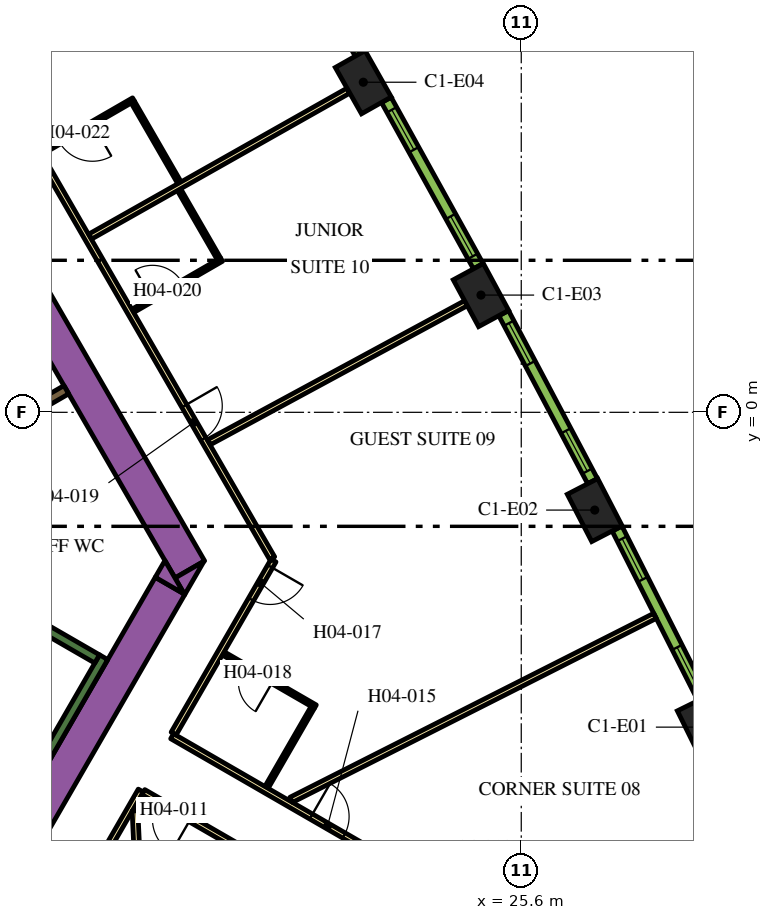
"""IFC4 building model, lengths in metres.
Left out: names, types, materials, properties, quantities, classifications, styles, units other than length and angle.
Written with IfcOpenShell. Run it as: python <this file> out.ifc"""

import sys

from ifc_helpers import new_model, si_unit, direction, frame, frame_2d, origin, origin_2d, place, context, subcontext, project, spatial, polyline, rectangle, outline, extrude, element, fill, save


model = new_model("IFC4")
c1 = context("Model", 3, precision=1e-05, world=origin(), true_north=direction((0.0, 1.0)))
c2 = subcontext(c1, "Body", "Model", "MODEL_VIEW")
j1 = project(units=[si_unit("LENGTHUNIT", "METRE"), si_unit("PLANEANGLEUNIT", "RADIAN")], contexts=[c1])
p1 = place(None, origin())
s1 = spatial("IfcSite", under=j1, at=p1, CompositionType="ELEMENT")
p2 = place(p1, origin())
s2 = spatial("IfcBuilding", under=s1, at=p2, CompositionType="ELEMENT")
p3 = place(p2, frame((0.0, 0.0, 70.5)))
s3 = spatial("IfcBuildingStorey", under=s2, at=p3, CompositionType="ELEMENT", Elevation=70.5)
for number, where, z_axis, x_axis in (
    (1, (30.421, -8.284, 0.0), (0.0, 0.0, 1.0), (-0.443, 0.897, 0.0)),
    (2, (27.533, -2.572, 0.0), (0.0, 0.0, 1.0), (-0.459, 0.888, 0.0)),
    (3, (24.54, 3.085, 0.0), (0.0, 0.0, 1.0), (-0.476, 0.88, 0.0)),
    (4, (21.443, 8.685, 0.0), (0.0, 0.0, 1.0), (-0.492, 0.871, 0.0)),
):
    element("IfcColumn", number, at=place(p3, frame(where, z_axis=z_axis, x_axis=x_axis)), inside=s3, PredefinedType="COLUMN", context=c2, shape_type="SweptSolid", body=[
        extrude(rectangle(XDim=1.4, YDim=0.9, at=origin_2d()), origin(), (0.0, 0.0, 1.0), 3.9),
    ])
p4 = place(p3, frame((6.461, 13.909, 0.0), z_axis=(0.0, 0.0, 1.0), x_axis=(0.500005804227, -0.866022052686, 0.0)))
e5 = element("IfcWall", 5, at=p4, inside=s3, PredefinedType="SOLIDWALL", context=c2, shape_type="SweptSolid", body=[
    extrude(rectangle(XDim=20.834, YDim=0.9, at=frame_2d((10.417, 0.0))), origin(), (0.0, 0.0, 1.0), 3.9),
])
p5 = place(p3, origin())
e6 = element("IfcWall", 6, at=p5, inside=s3, PredefinedType="SOLIDWALL", context=c2, shape_type="SweptSolid", body=[
    extrude(outline(polyline([(16.743, -4.8), (16.489, -4.36), (17.251, -3.92), (16.743, -4.8)])), origin(), (0.0, 0.0, 1.0), 3.9),
])
p6 = place(p3, frame((11.695, -12.644, 0.0), z_axis=(0.0, 0.0, 1.0), x_axis=(0.500010229568, 0.86601949766, 0.0)))
e7 = element("IfcWall", 7, at=p6, inside=s3, PredefinedType="SOLIDWALL", context=c2, shape_type="SweptSolid", body=[
    extrude(rectangle(XDim=9.326, YDim=0.9, at=frame_2d((4.663, 0.0))), origin(), (0.0, 0.0, 1.0), 3.9),
])
e8 = element("IfcWall", 8, at=p5, inside=s3, PredefinedType="SOLIDWALL", context=c2, shape_type="SweptSolid", body=[
    extrude(outline(polyline([(16.223, -3.9), (16.732, -4.78), (15.969, -4.34), (16.223, -3.9)])), origin(), (0.0, 0.0, 1.0), 3.9),
])
p7 = place(p3, frame((12.885, -9.431, 0.0), z_axis=(0.0, 0.0, 1.0), x_axis=(0.500020560727, 0.866013532718, 0.0)))
e9 = element("IfcWall", 9, at=p7, inside=s3, PredefinedType="SOLIDWALL", context=c2, shape_type="SweptSolid", body=[
    extrude(rectangle(XDim=3.45, YDim=0.25, at=frame_2d((1.725, 0.0))), origin(), (0.0, 0.0, 1.0), 3.9),
])
p8 = place(p3, frame((8.334, -2.964, 0.0), z_axis=(0.0, 0.0, 1.0), x_axis=(0.866016039709, -0.500016218704, 0.0)))
e10 = element("IfcWall", 10, at=p8, inside=s3, PredefinedType="SOLIDWALL", context=c2, shape_type="SweptSolid", body=[
    extrude(rectangle(XDim=7.05, YDim=0.25, at=frame_2d((3.525, 0.0))), origin(), (0.0, 0.0, 1.0), 3.9),
])
p9 = place(p3, frame((13.629, 0.594, 0.0), z_axis=(0.0, 0.0, 1.0), x_axis=(-0.86602790099, -0.499995674689, 0.0)))
e11 = element("IfcWall", 11, at=p9, inside=s3, PredefinedType="SOLIDWALL", context=c2, shape_type="SweptSolid", body=[
    extrude(rectangle(XDim=3.146, YDim=0.25, at=frame_2d((1.573, 0.0))), origin(), (0.0, 0.0, 1.0), 3.9),
])
p10 = place(p3, frame((16.412, -8.523, 0.0), z_axis=(0.0, 0.0, 1.0), x_axis=(0.866022197818, -0.500005552856, 0.0)))
e12 = element("IfcWall", 12, at=p10, inside=s3, PredefinedType="PARTITIONING", context=c2, shape_type="SweptSolid", body=[
    extrude(rectangle(XDim=16.224, YDim=0.15, at=frame_2d((8.112, 0.0))), origin(), (0.0, 0.0, 1.0), 2.75),
])
p11 = place(p10, frame((4.223, 0.0, 0.0)))
e13 = element("IfcOpeningElement", 13, at=p11, cuts=e12, PredefinedType="OPENING", context=c2, shape_type="SweptSolid", body=[
    extrude(rectangle(XDim=1.0, YDim=2.1, at=frame_2d((0.5, 1.05))), frame((0.0, 0.085, 0.0), z_axis=(0.0, -1.0, 0.0), x_axis=(1.0, 0.0, 0.0)), (0.0, 0.0, 1.0), 0.17),
])
p12 = place(p3, frame((19.081, -3.9, 0.0), z_axis=(0.0, 0.0, 1.0), x_axis=(-0.499974327079, -0.866040225545, 0.0)))
e14 = element("IfcWall", 14, at=p12, inside=s3, PredefinedType="PARTITIONING", context=c2, shape_type="SweptSolid", body=[
    extrude(rectangle(XDim=5.258, YDim=0.15, at=frame_2d((2.629, 0.0))), origin(), (0.0, 0.0, 1.0), 2.75),
])
p13 = place(p12, frame((0.18, 0.0, 0.0)))
e15 = element("IfcOpeningElement", 15, at=p13, cuts=e14, PredefinedType="OPENING", context=c2, shape_type="SweptSolid", body=[
    extrude(rectangle(XDim=1.0, YDim=2.1, at=frame_2d((0.5, 1.05))), frame((0.0, 0.085, 0.0), z_axis=(0.0, -1.0, 0.0), x_axis=(1.0, 0.0, 0.0)), (0.0, 0.0, 1.0), 0.17),
])
p14 = place(p3, frame((6.163, 18.475, 0.0), z_axis=(0.0, 0.0, 1.0), x_axis=(0.500001317485, -0.866024643133, 0.0)))
e16 = element("IfcWall", 16, at=p14, inside=s3, PredefinedType="PARTITIONING", context=c2, shape_type="SweptSolid", body=[
    extrude(rectangle(XDim=25.767, YDim=0.15, at=frame_2d((12.883, 0.0))), origin(), (0.0, 0.0, 1.0), 2.75),
])
p15 = place(p14, frame((21.138, 0.0, 0.0)))
e17 = element("IfcOpeningElement", 17, at=p15, cuts=e16, PredefinedType="OPENING", context=c2, shape_type="SweptSolid", body=[
    extrude(rectangle(XDim=1.0, YDim=2.1, at=frame_2d((0.5, 1.05))), frame((0.0, 0.085, 0.0), z_axis=(0.0, -1.0, 0.0), x_axis=(1.0, 0.0, 0.0)), (0.0, 0.0, 1.0), 0.17),
])
p16 = place(p14, frame((9.948, 0.0, 0.0)))
e18 = element("IfcOpeningElement", 18, at=p16, cuts=e16, PredefinedType="OPENING", context=c2, shape_type="SweptSolid", body=[
    extrude(rectangle(XDim=1.1, YDim=2.1, at=frame_2d((0.55, 1.05))), frame((0.0, 0.085, 0.0), z_axis=(0.0, -1.0, 0.0), x_axis=(1.0, 0.0, 0.0)), (0.0, 0.0, 1.0), 0.17),
])
p17 = place(p14, frame((8.641, 0.0, 0.0)))
e19 = element("IfcOpeningElement", 19, at=p17, cuts=e16, PredefinedType="OPENING", context=c2, shape_type="SweptSolid", body=[
    extrude(rectangle(XDim=1.0, YDim=2.1, at=frame_2d((0.5, 1.05))), frame((0.0, 0.085, 0.0), z_axis=(0.0, -1.0, 0.0), x_axis=(1.0, 0.0, 0.0)), (0.0, 0.0, 1.0), 0.17),
])
p18 = place(p14, frame((0.18, 0.0, 0.0)))
e20 = element("IfcOpeningElement", 20, at=p18, cuts=e16, PredefinedType="OPENING", context=c2, shape_type="SweptSolid", body=[
    extrude(rectangle(XDim=1.0, YDim=2.1, at=frame_2d((0.5, 1.05))), frame((0.0, 0.085, 0.0), z_axis=(0.0, -1.0, 0.0), x_axis=(1.0, 0.0, 0.0)), (0.0, 0.0, 1.0), 0.17),
])
p19 = place(p3, frame((15.587, -9.952, 0.0), z_axis=(0.0, 0.0, 1.0), x_axis=(-0.500016618951, -0.866015808616, 0.0)))
e21 = element("IfcWall", 21, at=p19, inside=s3, PredefinedType="PARTITIONING", context=c2, shape_type="SweptSolid", body=[
    extrude(rectangle(XDim=5.268, YDim=0.15, at=frame_2d((2.634, 0.0))), origin(), (0.0, 0.0, 1.0), 2.75),
])
p20 = place(p3, frame((29.638, -18.064, 0.0), z_axis=(0.0, 0.0, 1.0), x_axis=(-0.866026175601, 0.499998663172, 0.0)))
e22 = element("IfcWall", 22, at=p20, inside=s3, PredefinedType="PARTITIONING", context=c2, shape_type="SweptSolid", body=[
    extrude(rectangle(XDim=16.144, YDim=0.15, at=frame_2d((8.072, 0.0))), origin(), (0.0, 0.0, 1.0), 2.75),
])
p21 = place(p20, frame((14.714, 0.0, 0.0)))
e23 = element("IfcOpeningElement", 23, at=p21, cuts=e22, PredefinedType="OPENING", context=c2, shape_type="SweptSolid", body=[
    extrude(rectangle(XDim=1.0, YDim=2.1, at=frame_2d((0.5, 1.05))), frame((0.0, 0.085, 0.0), z_axis=(0.0, -1.0, 0.0), x_axis=(1.0, 0.0, 0.0)), (0.0, 0.0, 1.0), 0.17),
])
p22 = place(p20, frame((7.275, 0.0, 0.0)))
e24 = element("IfcOpeningElement", 24, at=p22, cuts=e22, PredefinedType="OPENING", context=c2, shape_type="SweptSolid", body=[
    extrude(rectangle(XDim=1.0, YDim=2.1, at=frame_2d((0.5, 1.05))), frame((0.0, 0.085, 0.0), z_axis=(0.0, -1.0, 0.0), x_axis=(1.0, 0.0, 0.0)), (0.0, 0.0, 1.0), 0.17),
])
p23 = place(p3, frame((21.052, 8.464, 0.0), z_axis=(0.0, 0.0, 1.0), x_axis=(-0.87059371954, -0.492002617368, 0.0)))
e25 = element("IfcWall", 25, at=p23, inside=s3, PredefinedType="PARTITIONING", context=c2, shape_type="SweptSolid", body=[
    extrude(rectangle(XDim=7.803, YDim=0.15, at=frame_2d((3.902, 0.0))), origin(), (0.0, 0.0, 1.0), 2.75),
])
p24 = place(p3, frame((15.973, -22.109, 0.0), z_axis=(0.0, 0.0, 1.0), x_axis=(-0.046191717129, 0.998932592955, 0.0)))
e26 = element("IfcWall", 26, at=p24, inside=s3, PredefinedType="PARTITIONING", context=c2, shape_type="SweptSolid", body=[
    extrude(rectangle(XDim=11.638, YDim=0.15, at=frame_2d((5.819, 0.0))), origin(), (0.0, 0.0, 1.0), 2.75),
])
p25 = place(p3, frame((24.145, 2.871, 0.0), z_axis=(0.0, 0.0, 1.0), x_axis=(-0.879551725039, -0.475803281809, 0.0)))
e27 = element("IfcWall", 27, at=p25, inside=s3, PredefinedType="PARTITIONING", context=c2, shape_type="SweptSolid", body=[
    extrude(rectangle(XDim=7.688, YDim=0.15, at=frame_2d((3.844, 0.0))), origin(), (0.0, 0.0, 1.0), 2.75),
])
p26 = place(p3, frame((29.12, -5.356, 0.0), z_axis=(0.0, 0.0, 1.0), x_axis=(-0.892401965553, -0.451241323327, 0.0)))
e28 = element("IfcWall", 28, at=p26, inside=s3, PredefinedType="PARTITIONING", context=c2, shape_type="SweptSolid", body=[
    extrude(rectangle(XDim=10.729, YDim=0.15, at=frame_2d((5.364, 0.0))), origin(), (0.0, 0.0, 1.0), 2.75),
])
p27 = place(p3, frame((20.182, -7.743, 0.0), z_axis=(0.0, 0.0, 1.0), x_axis=(-0.866034573852, 0.49998411664, 0.0)))
e29 = element("IfcWall", 29, at=p27, inside=s3, PredefinedType="PARTITIONING", context=c2, shape_type="SweptSolid", body=[
    extrude(rectangle(XDim=2.8, YDim=0.1, at=frame_2d((1.4, 0.0))), origin(), (0.0, 0.0, 1.0), 2.75),
])
p28 = place(p27, frame((1.3, 0.0, 0.0)))
e30 = element("IfcOpeningElement", 30, at=p28, cuts=e29, PredefinedType="OPENING", context=c2, shape_type="SweptSolid", body=[
    extrude(rectangle(XDim=0.9, YDim=2.1, at=frame_2d((0.45, 1.05))), frame((0.0, 0.06, 0.0), z_axis=(0.0, -1.0, 0.0), x_axis=(1.0, 0.0, 0.0)), (0.0, 0.0, 1.0), 0.12),
])
p29 = place(p3, frame((20.109, -7.771, 0.0), z_axis=(0.0, 0.0, 1.0), x_axis=(-0.500077573772, -0.865980611914, 0.0)))
e31 = element("IfcWall", 31, at=p29, inside=s3, PredefinedType="PARTITIONING", context=c2, shape_type="SweptSolid", body=[
    extrude(rectangle(XDim=2.42, YDim=0.1, at=frame_2d((1.21, 0.0))), origin(), (0.0, 0.0, 1.0), 2.75),
])
p30 = place(p3, frame((15.376, 2.668, 0.0), z_axis=(0.0, 0.0, 1.0), x_axis=(0.866036505625, 0.499980770555, 0.0)))
e32 = element("IfcWall", 32, at=p30, inside=s3, PredefinedType="PARTITIONING", context=c2, shape_type="SweptSolid", body=[
    extrude(rectangle(XDim=2.7, YDim=0.1, at=frame_2d((1.35, 0.0))), origin(), (0.0, 0.0, 1.0), 2.75),
])
p31 = place(p30, frame((0.6, 0.0, 0.0)))
e33 = element("IfcOpeningElement", 33, at=p31, cuts=e32, PredefinedType="OPENING", context=c2, shape_type="SweptSolid", body=[
    extrude(rectangle(XDim=0.9, YDim=2.1, at=frame_2d((0.45, 1.05))), frame((0.0, 0.06, 0.0), z_axis=(0.0, -1.0, 0.0), x_axis=(1.0, 0.0, 0.0)), (0.0, 0.0, 1.0), 0.12),
])
p32 = place(p3, frame((17.646, 4.036, 0.0), z_axis=(0.0, 0.0, 1.0), x_axis=(-0.500027713859, 0.866009402589, 0.0)))
e34 = element("IfcWall", 34, at=p32, inside=s3, PredefinedType="PARTITIONING", context=c2, shape_type="SweptSolid", body=[
    extrude(rectangle(XDim=2.1, YDim=0.1, at=frame_2d((1.05, 0.0))), origin(), (0.0, 0.0, 1.0), 2.75),
])
p33 = place(p3, frame((15.397, 8.231, 0.0), z_axis=(0.0, 0.0, 1.0), x_axis=(-0.866018616679, -0.500011755427, 0.0)))
e35 = element("IfcWall", 35, at=p33, inside=s3, PredefinedType="PARTITIONING", context=c2, shape_type="SweptSolid", body=[
    extrude(rectangle(XDim=2.8, YDim=0.1, at=frame_2d((1.4, 0.0))), origin(), (0.0, 0.0, 1.0), 2.75),
])
p34 = place(p33, frame((1.25, 0.0, 0.0)))
e36 = element("IfcOpeningElement", 36, at=p34, cuts=e35, PredefinedType="OPENING", context=c2, shape_type="SweptSolid", body=[
    extrude(rectangle(XDim=1.0, YDim=2.1, at=frame_2d((0.5, 1.05))), frame((0.0, 0.06, 0.0), z_axis=(0.0, -1.0, 0.0), x_axis=(1.0, 0.0, 0.0)), (0.0, 0.0, 1.0), 0.12),
])
p35 = place(p3, frame((15.379, 8.163, 0.0), z_axis=(0.0, 0.0, 1.0), x_axis=(0.499987006516, -0.866032905446, 0.0)))
e37 = element("IfcWall", 37, at=p35, inside=s3, PredefinedType="PARTITIONING", context=c2, shape_type="SweptSolid", body=[
    extrude(rectangle(XDim=2.45, YDim=0.1, at=frame_2d((1.225, 0.0))), origin(), (0.0, 0.0, 1.0), 2.75),
])
p36 = place(p3, frame((30.377, -7.521, 0.0), z_axis=(0.0, 0.0, 1.0), x_axis=(-0.451233929645, 0.892405704115, 0.0)))
e38 = element("IfcWall", 38, at=p36, inside=s3, PredefinedType="SOLIDWALL", context=c2, shape_type="SweptSolid", body=[
    extrude(rectangle(XDim=4.998, YDim=0.29, at=frame_2d((2.499, 0.0))), origin(), (0.0, 0.0, 1.0), 3.65),
])
p37 = place(p36, frame((0.297, 0.0, 0.9)))
e39 = element("IfcOpeningElement", 39, at=p37, cuts=e38, PredefinedType="OPENING", context=c2, shape_type="SweptSolid", body=[
    extrude(rectangle(XDim=1.2, YDim=2.15, at=frame_2d((0.6, 1.075))), frame((0.0, 0.155, 0.0), z_axis=(0.0, -1.0, 0.0), x_axis=(1.0, 0.0, 0.0)), (0.0, 0.0, 1.0), 0.31),
])
p38 = place(p36, frame((3.501, 0.0, 0.9)))
e40 = element("IfcOpeningElement", 40, at=p38, cuts=e38, PredefinedType="OPENING", context=c2, shape_type="SweptSolid", body=[
    extrude(rectangle(XDim=1.2, YDim=2.15, at=frame_2d((0.6, 1.075))), frame((0.0, 0.155, 0.0), z_axis=(0.0, -1.0, 0.0), x_axis=(1.0, 0.0, 0.0)), (0.0, 0.0, 1.0), 0.31),
])
p39 = place(p3, frame((27.475, -1.81, 0.0), z_axis=(0.0, 0.0, 1.0), x_axis=(-0.467629620899, 0.883924509026, 0.0)))
e41 = element("IfcWall", 41, at=p39, inside=s3, PredefinedType="SOLIDWALL", context=c2, shape_type="SweptSolid", body=[
    extrude(rectangle(XDim=4.998, YDim=0.29, at=frame_2d((2.499, 0.0))), origin(), (0.0, 0.0, 1.0), 3.65),
])
p40 = place(p39, frame((0.297, 0.0, 0.9)))
e42 = element("IfcOpeningElement", 42, at=p40, cuts=e41, PredefinedType="OPENING", context=c2, shape_type="SweptSolid", body=[
    extrude(rectangle(XDim=1.2, YDim=2.15, at=frame_2d((0.6, 1.075))), frame((0.0, 0.155, 0.0), z_axis=(0.0, -1.0, 0.0), x_axis=(1.0, 0.0, 0.0)), (0.0, 0.0, 1.0), 0.31),
])
p41 = place(p39, frame((3.501, 0.0, 0.9)))
e43 = element("IfcOpeningElement", 43, at=p41, cuts=e41, PredefinedType="OPENING", context=c2, shape_type="SweptSolid", body=[
    extrude(rectangle(XDim=1.2, YDim=2.15, at=frame_2d((0.6, 1.075))), frame((0.0, 0.155, 0.0), z_axis=(0.0, -1.0, 0.0), x_axis=(1.0, 0.0, 0.0)), (0.0, 0.0, 1.0), 0.31),
])
p42 = place(p3, frame((24.468, 3.846, 0.0), z_axis=(0.0, 0.0, 1.0), x_axis=(-0.483912572871, 0.875116347589, 0.0)))
e44 = element("IfcWall", 44, at=p42, inside=s3, PredefinedType="SOLIDWALL", context=c2, shape_type="SweptSolid", body=[
    extrude(rectangle(XDim=4.998, YDim=0.29, at=frame_2d((2.499, 0.0))), origin(), (0.0, 0.0, 1.0), 3.65),
])
p43 = place(p42, frame((0.297, 0.0, 0.9)))
e45 = element("IfcOpeningElement", 45, at=p43, cuts=e44, PredefinedType="OPENING", context=c2, shape_type="SweptSolid", body=[
    extrude(rectangle(XDim=1.2, YDim=2.15, at=frame_2d((0.6, 1.075))), frame((0.0, 0.155, 0.0), z_axis=(0.0, -1.0, 0.0), x_axis=(1.0, 0.0, 0.0)), (0.0, 0.0, 1.0), 0.31),
])
p44 = place(p42, frame((3.501, 0.0, 0.9)))
e46 = element("IfcOpeningElement", 46, at=p44, cuts=e44, PredefinedType="OPENING", context=c2, shape_type="SweptSolid", body=[
    extrude(rectangle(XDim=1.2, YDim=2.15, at=frame_2d((0.6, 1.075))), frame((0.0, 0.155, 0.0), z_axis=(0.0, -1.0, 0.0), x_axis=(1.0, 0.0, 0.0)), (0.0, 0.0, 1.0), 0.31),
])
p45 = place(p3, frame((21.357, 9.445, 0.0), z_axis=(0.0, 0.0, 1.0), x_axis=(-0.50002123722, 0.866013142123, 0.0)))
e47 = element("IfcWall", 47, at=p45, inside=s3, PredefinedType="SOLIDWALL", context=c2, shape_type="SweptSolid", body=[
    extrude(rectangle(XDim=4.998, YDim=0.29, at=frame_2d((2.499, 0.0))), origin(), (0.0, 0.0, 1.0), 3.65),
])
p46 = place(p45, frame((0.297, 0.0, 0.9)))
e48 = element("IfcOpeningElement", 48, at=p46, cuts=e47, PredefinedType="OPENING", context=c2, shape_type="SweptSolid", body=[
    extrude(rectangle(XDim=1.2, YDim=2.15, at=frame_2d((0.6, 1.075))), frame((0.0, 0.155, 0.0), z_axis=(0.0, -1.0, 0.0), x_axis=(1.0, 0.0, 0.0)), (0.0, 0.0, 1.0), 0.31),
])
p47 = place(p45, frame((3.501, 0.0, 0.9)))
e49 = element("IfcOpeningElement", 49, at=p47, cuts=e47, PredefinedType="OPENING", context=c2, shape_type="SweptSolid", body=[
    extrude(rectangle(XDim=1.2, YDim=2.15, at=frame_2d((0.6, 1.075))), frame((0.0, 0.155, 0.0), z_axis=(0.0, -1.0, 0.0), x_axis=(1.0, 0.0, 0.0)), (0.0, 0.0, 1.0), 0.31),
])
p48 = place(p21, origin())
e50 = element("IfcDoor", 50, at=p48, inside=s3, OperationType="SINGLE_SWING_RIGHT", PredefinedType="DOOR", context=c2, shape_type="SweptSolid", body=[
    extrude(rectangle(XDim=1.0, YDim=2.1, at=frame_2d((0.5, 1.05))), frame((0.0, 0.025, 0.0), z_axis=(0.0, -1.0, 0.0), x_axis=(1.0, 0.0, 0.0)), (0.0, 0.0, 1.0), 0.05),
])
fill(e23, e50)
p49 = place(p11, origin())
e51 = element("IfcDoor", 51, at=p49, inside=s3, OperationType="SINGLE_SWING_LEFT", PredefinedType="DOOR", context=c2, shape_type="SweptSolid", body=[
    extrude(rectangle(XDim=1.0, YDim=2.1, at=frame_2d((0.5, 1.05))), frame((0.0, 0.025, 0.0), z_axis=(0.0, -1.0, 0.0), x_axis=(1.0, 0.0, 0.0)), (0.0, 0.0, 1.0), 0.05),
])
fill(e13, e51)
p50 = place(p13, origin())
e52 = element("IfcDoor", 52, at=p50, inside=s3, OperationType="SINGLE_SWING_LEFT", PredefinedType="DOOR", context=c2, shape_type="SweptSolid", body=[
    extrude(rectangle(XDim=1.0, YDim=2.1, at=frame_2d((0.5, 1.05))), frame((0.0, 0.025, 0.0), z_axis=(0.0, -1.0, 0.0), x_axis=(1.0, 0.0, 0.0)), (0.0, 0.0, 1.0), 0.05),
])
fill(e15, e52)
p51 = place(p28, origin())
e53 = element("IfcDoor", 53, at=p51, inside=s3, OperationType="SINGLE_SWING_RIGHT", PredefinedType="DOOR", context=c2, shape_type="SweptSolid", body=[
    extrude(rectangle(XDim=0.9, YDim=2.1, at=frame_2d((0.45, 1.05))), frame((0.0, 0.025, 0.0), z_axis=(0.0, -1.0, 0.0), x_axis=(1.0, 0.0, 0.0)), (0.0, 0.0, 1.0), 0.05),
])
fill(e30, e53)
p52 = place(p15, origin())
e54 = element("IfcDoor", 54, at=p52, inside=s3, OperationType="SINGLE_SWING_RIGHT", PredefinedType="DOOR", context=c2, shape_type="SweptSolid", body=[
    extrude(rectangle(XDim=1.0, YDim=2.1, at=frame_2d((0.5, 1.05))), frame((0.0, 0.025, 0.0), z_axis=(0.0, -1.0, 0.0), x_axis=(1.0, 0.0, 0.0)), (0.0, 0.0, 1.0), 0.05),
])
fill(e17, e54)
p53 = place(p31, origin())
e55 = element("IfcDoor", 55, at=p53, inside=s3, OperationType="SINGLE_SWING_LEFT", PredefinedType="DOOR", context=c2, shape_type="SweptSolid", body=[
    extrude(rectangle(XDim=0.9, YDim=2.1, at=frame_2d((0.45, 1.05))), frame((0.0, 0.025, 0.0), z_axis=(0.0, -1.0, 0.0), x_axis=(1.0, 0.0, 0.0)), (0.0, 0.0, 1.0), 0.05),
])
fill(e33, e55)
p54 = place(p34, origin())
e56 = element("IfcDoor", 56, at=p54, inside=s3, OperationType="SINGLE_SWING_LEFT", PredefinedType="DOOR", context=c2, shape_type="SweptSolid", body=[
    extrude(rectangle(XDim=1.0, YDim=2.1, at=frame_2d((0.5, 1.05))), frame((0.0, 0.025, 0.0), z_axis=(0.0, -1.0, 0.0), x_axis=(1.0, 0.0, 0.0)), (0.0, 0.0, 1.0), 0.05),
])
fill(e36, e56)
p55 = place(p37, origin())
e57 = element("IfcWindow", 57, at=p55, inside=s3, PartitioningType="DOUBLE_PANEL_VERTICAL", PredefinedType="WINDOW", context=c2, shape_type="SweptSolid", body=[
    extrude(rectangle(XDim=1.2, YDim=2.15, at=frame_2d((0.6, 1.075))), frame((0.0, 0.015, 0.0), z_axis=(0.0, -1.0, 0.0), x_axis=(1.0, 0.0, 0.0)), (0.0, 0.0, 1.0), 0.06),
])
fill(e39, e57)
p56 = place(p38, origin())
e58 = element("IfcWindow", 58, at=p56, inside=s3, PartitioningType="DOUBLE_PANEL_VERTICAL", PredefinedType="WINDOW", context=c2, shape_type="SweptSolid", body=[
    extrude(rectangle(XDim=1.2, YDim=2.15, at=frame_2d((0.6, 1.075))), frame((0.0, 0.015, 0.0), z_axis=(0.0, -1.0, 0.0), x_axis=(1.0, 0.0, 0.0)), (0.0, 0.0, 1.0), 0.06),
])
fill(e40, e58)
p57 = place(p40, origin())
e59 = element("IfcWindow", 59, at=p57, inside=s3, PartitioningType="DOUBLE_PANEL_VERTICAL", PredefinedType="WINDOW", context=c2, shape_type="SweptSolid", body=[
    extrude(rectangle(XDim=1.2, YDim=2.15, at=frame_2d((0.6, 1.075))), frame((0.0, 0.015, 0.0), z_axis=(0.0, -1.0, 0.0), x_axis=(1.0, 0.0, 0.0)), (0.0, 0.0, 1.0), 0.06),
])
fill(e42, e59)
p58 = place(p41, origin())
e60 = element("IfcWindow", 60, at=p58, inside=s3, PartitioningType="DOUBLE_PANEL_VERTICAL", PredefinedType="WINDOW", context=c2, shape_type="SweptSolid", body=[
    extrude(rectangle(XDim=1.2, YDim=2.15, at=frame_2d((0.6, 1.075))), frame((0.0, 0.015, 0.0), z_axis=(0.0, -1.0, 0.0), x_axis=(1.0, 0.0, 0.0)), (0.0, 0.0, 1.0), 0.06),
])
fill(e43, e60)
p59 = place(p43, origin())
e61 = element("IfcWindow", 61, at=p59, inside=s3, PartitioningType="DOUBLE_PANEL_VERTICAL", PredefinedType="WINDOW", context=c2, shape_type="SweptSolid", body=[
    extrude(rectangle(XDim=1.2, YDim=2.15, at=frame_2d((0.6, 1.075))), frame((0.0, 0.015, 0.0), z_axis=(0.0, -1.0, 0.0), x_axis=(1.0, 0.0, 0.0)), (0.0, 0.0, 1.0), 0.06),
])
fill(e45, e61)
p60 = place(p44, origin())
e62 = element("IfcWindow", 62, at=p60, inside=s3, PartitioningType="DOUBLE_PANEL_VERTICAL", PredefinedType="WINDOW", context=c2, shape_type="SweptSolid", body=[
    extrude(rectangle(XDim=1.2, YDim=2.15, at=frame_2d((0.6, 1.075))), frame((0.0, 0.015, 0.0), z_axis=(0.0, -1.0, 0.0), x_axis=(1.0, 0.0, 0.0)), (0.0, 0.0, 1.0), 0.06),
])
fill(e46, e62)
save(model, sys.argv[1])
